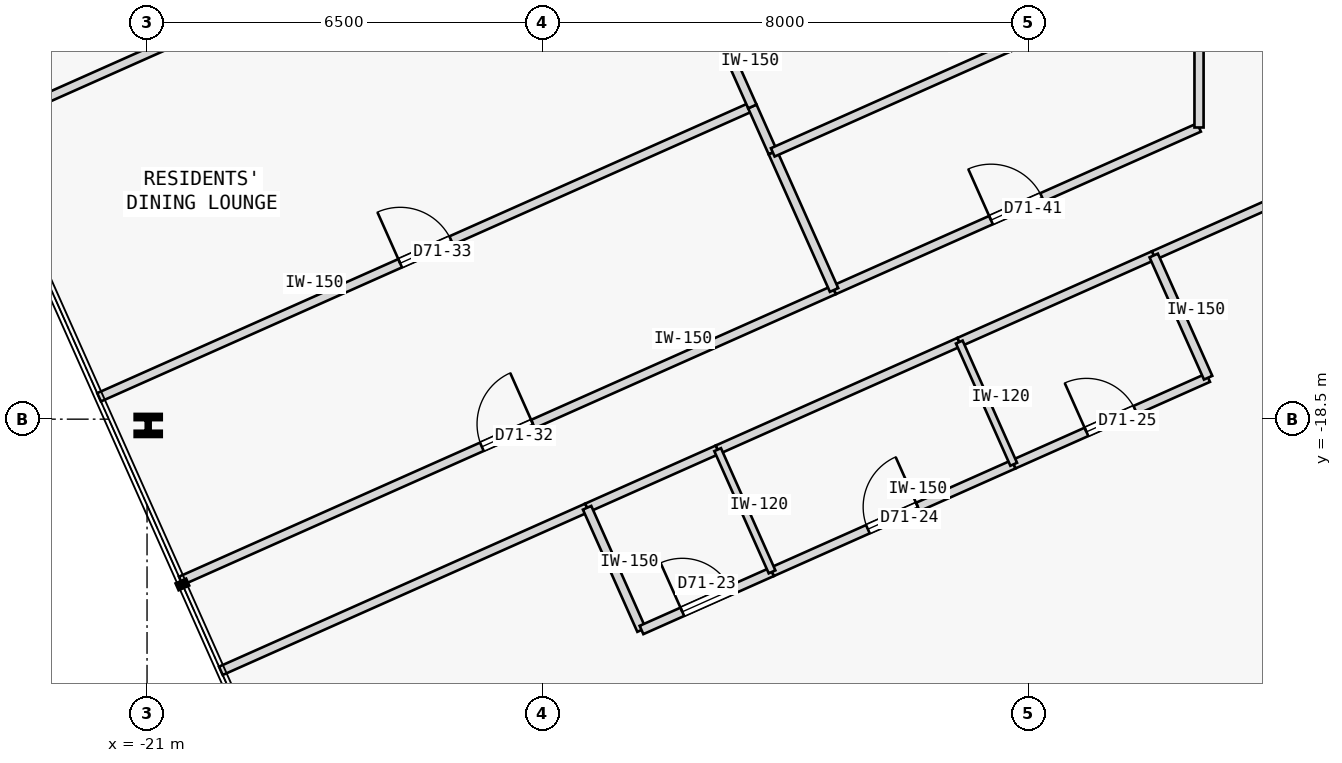
"""IFC4 building model, lengths in metres.
Left out: names, types, materials, properties, quantities, classifications, styles, units other than length and angle.
Written with IfcOpenShell. Run it as: python <this file> out.ifc"""

import sys

from ifc_helpers import new_model, si_unit, direction, frame, frame_2d, origin, origin_2d, place, context, subcontext, project, spatial, rectangle, i_section, extrude, element, fill, save


model = new_model("IFC4")
c1 = context("Model", 3, precision=1e-05, world=origin(), true_north=direction((0.0, 1.0)))
c2 = subcontext(c1, "Body", "Model", "MODEL_VIEW")
j1 = project(units=[si_unit("LENGTHUNIT", "METRE"), si_unit("PLANEANGLEUNIT", "RADIAN")], contexts=[c1])
p1 = place(None, origin())
s1 = spatial("IfcSite", under=j1, at=p1, CompositionType="ELEMENT")
p2 = place(p1, origin())
s2 = spatial("IfcBuilding", under=s1, at=p2, CompositionType="ELEMENT")
p3 = place(p2, frame((0.0, 0.0, 265.55)))
s3 = spatial("IfcBuildingStorey", under=s2, at=p3, CompositionType="ELEMENT", Elevation=265.55)
p4 = place(p3, frame((-20.981, -18.603, 0.0), z_axis=(0.0, 0.0, 1.0), x_axis=(1.0, 0.0, 0.0)))
e1 = element("IfcColumn", 1, at=p4, inside=s3, PredefinedType="COLUMN", context=c2, shape_type="SweptSolid", body=[
    extrude(i_section(OverallWidth=0.401, OverallDepth=0.335, WebThickness=0.036, FlangeThickness=0.058, FilletRadius=0.015, at=origin_2d()), origin(), (0.0, 0.0, 1.0), 3.35),
])
p5 = place(p3, frame((-19.786, -22.639, 0.0), z_axis=(0.0, 0.0, 1.0), x_axis=(0.913548717067, 0.406729322211, 0.0)))
e2 = element("IfcWall", 2, at=p5, inside=s3, PredefinedType="PARTITIONING", context=c2, shape_type="SweptSolid", body=[
    extrude(rectangle(XDim=6.593, YDim=0.15, at=frame_2d((3.297, 0.0))), origin(), (0.0, 0.0, 1.0), 3.125),
])
p6 = place(p3, frame((-4.445, -15.808, 0.0), z_axis=(0.0, 0.0, 1.0), x_axis=(0.913546853922, 0.406733506966, 0.0)))
e3 = element("IfcWall", 3, at=p6, inside=s3, PredefinedType="PARTITIONING", context=c2, shape_type="SweptSolid", body=[
    extrude(rectangle(XDim=12.751, YDim=0.15, at=frame_2d((6.375, 0.0))), origin(), (0.0, 0.0, 1.0), 3.125),
])
p7 = place(p6, frame((5.9, 0.0, 0.0)))
e4 = element("IfcOpeningElement", 4, at=p7, cuts=e3, PredefinedType="OPENING", context=c2, shape_type="SweptSolid", body=[
    extrude(rectangle(XDim=0.95, YDim=2.15, at=frame_2d((0.475, 1.075))), frame((0.0, 0.085, 0.0), z_axis=(0.0, -1.0, 0.0), x_axis=(1.0, 0.0, 0.0)), (0.0, 0.0, 1.0), 0.17),
])
p8 = place(p3, frame((-13.763, -19.957, 0.0), z_axis=(0.0, 0.0, 1.0), x_axis=(0.913541436194, 0.406745675276, 0.0)))
e5 = element("IfcWall", 5, at=p8, inside=s3, PredefinedType="PARTITIONING", context=c2, shape_type="SweptSolid", body=[
    extrude(rectangle(XDim=2.35, YDim=0.15, at=frame_2d((1.175, 0.0))), origin(), (0.0, 0.0, 1.0), 3.125),
])
p9 = place(p3, frame((-11.616, -19.001, 0.0), z_axis=(0.0, 0.0, 1.0), x_axis=(0.913545193015, 0.406737237438, 0.0)))
e6 = element("IfcWall", 6, at=p9, inside=s3, PredefinedType="PARTITIONING", context=c2, shape_type="SweptSolid", body=[
    extrude(rectangle(XDim=4.35, YDim=0.15, at=frame_2d((2.175, 0.0))), origin(), (0.0, 0.0, 1.0), 3.125),
])
p10 = place(p3, frame((-7.643, -17.232, 0.0), z_axis=(0.0, 0.0, 1.0), x_axis=(0.913549606868, 0.406727323635, 0.0)))
e7 = element("IfcWall", 7, at=p10, inside=s3, PredefinedType="PARTITIONING", context=c2, shape_type="SweptSolid", body=[
    extrude(rectangle(XDim=3.5, YDim=0.15, at=frame_2d((1.75, 0.0))), origin(), (0.0, 0.0, 1.0), 3.125),
])
p11 = place(p3, frame((-20.445, -21.159, 0.0), z_axis=(0.0, 0.0, 1.0), x_axis=(0.913547681516, 0.406731648137, 0.0)))
e8 = element("IfcWall", 8, at=p11, inside=s3, PredefinedType="PARTITIONING", context=c2, shape_type="SweptSolid", body=[
    extrude(rectangle(XDim=11.76, YDim=0.15, at=frame_2d((5.88, 0.0))), origin(), (0.0, 0.0, 1.0), 3.125),
])
p12 = place(p11, frame((5.42, 0.0, 0.0)))
e9 = element("IfcOpeningElement", 9, at=p12, cuts=e8, PredefinedType="OPENING", context=c2, shape_type="SweptSolid", body=[
    extrude(rectangle(XDim=0.92, YDim=2.15, at=frame_2d((0.46, 1.075))), frame((0.0, 0.085, 0.0), z_axis=(0.0, -1.0, 0.0), x_axis=(1.0, 0.0, 0.0)), (0.0, 0.0, 1.0), 0.17),
])
p13 = place(p3, frame((-9.702, -16.375, 0.0), z_axis=(0.0, 0.0, 1.0), x_axis=(0.913552389019, 0.406721074594, 0.0)))
e10 = element("IfcWall", 10, at=p13, inside=s3, PredefinedType="PARTITIONING", context=c2, shape_type="SweptSolid", body=[
    extrude(rectangle(XDim=6.57, YDim=0.15, at=frame_2d((3.285, 0.0))), origin(), (0.0, 0.0, 1.0), 3.125),
])
p14 = place(p13, frame((2.825, 0.0, 0.0)))
e11 = element("IfcOpeningElement", 11, at=p14, cuts=e10, PredefinedType="OPENING", context=c2, shape_type="SweptSolid", body=[
    extrude(rectangle(XDim=0.92, YDim=2.15, at=frame_2d((0.46, 1.075))), frame((0.0, 0.085, 0.0), z_axis=(0.0, -1.0, 0.0), x_axis=(1.0, 0.0, 0.0)), (0.0, 0.0, 1.0), 0.17),
])
p15 = place(p3, frame((-3.7, -13.703, 0.0), z_axis=(0.0, 0.0, 1.0), x_axis=(9.0033312e-05, 0.999999995947, 0.0)))
e12 = element("IfcWall", 12, at=p15, inside=s3, PredefinedType="PARTITIONING", context=c2, shape_type="SweptSolid", body=[
    extrude(rectangle(XDim=2.712, YDim=0.15, at=frame_2d((1.356, 0.0))), origin(), (0.0, 0.0, 1.0), 3.125),
])
p16 = place(p3, frame((-12.868, -21.967, 0.0), z_axis=(0.0, 0.0, 1.0), x_axis=(-0.406725294076, 0.913550510459, 0.0)))
e13 = element("IfcWall", 13, at=p16, inside=s3, PredefinedType="PARTITIONING", context=c2, shape_type="SweptSolid", body=[
    extrude(rectangle(XDim=2.2, YDim=0.15, at=frame_2d((1.1, 0.0))), origin(), (0.0, 0.0, 1.0), 3.125),
])
p17 = place(p3, frame((-12.868, -21.967, 0.0), z_axis=(0.0, 0.0, 1.0), x_axis=(0.913541436194, 0.406745675276, 0.0)))
e14 = element("IfcWall", 14, at=p17, inside=s3, PredefinedType="PARTITIONING", context=c2, shape_type="SweptSolid", body=[
    extrude(rectangle(XDim=2.35, YDim=0.15, at=frame_2d((1.175, 0.0))), origin(), (0.0, 0.0, 1.0), 3.125),
])
p18 = place(p17, frame((0.735, 0.0, 0.0)))
e15 = element("IfcOpeningElement", 15, at=p18, cuts=e14, PredefinedType="OPENING", context=c2, shape_type="SweptSolid", body=[
    extrude(rectangle(XDim=0.88, YDim=2.15, at=frame_2d((0.44, 1.075))), frame((0.0, 0.085, 0.0), z_axis=(0.0, -1.0, 0.0), x_axis=(1.0, 0.0, 0.0)), (0.0, 0.0, 1.0), 0.17),
])
p19 = place(p3, frame((-10.722, -21.011, 0.0), z_axis=(0.0, 0.0, 1.0), x_axis=(0.913545193015, 0.406737237438, 0.0)))
e16 = element("IfcWall", 16, at=p19, inside=s3, PredefinedType="PARTITIONING", context=c2, shape_type="SweptSolid", body=[
    extrude(rectangle(XDim=4.35, YDim=0.15, at=frame_2d((2.175, 0.0))), origin(), (0.0, 0.0, 1.0), 3.125),
])
p20 = place(p19, frame((1.725, 0.0, 0.0)))
e17 = element("IfcOpeningElement", 17, at=p20, cuts=e16, PredefinedType="OPENING", context=c2, shape_type="SweptSolid", body=[
    extrude(rectangle(XDim=0.9, YDim=2.15, at=frame_2d((0.45, 1.075))), frame((0.0, 0.085, 0.0), z_axis=(0.0, -1.0, 0.0), x_axis=(1.0, 0.0, 0.0)), (0.0, 0.0, 1.0), 0.17),
])
p21 = place(p3, frame((-6.748, -19.242, 0.0), z_axis=(0.0, 0.0, 1.0), x_axis=(0.913549606868, 0.406727323635, 0.0)))
e18 = element("IfcWall", 18, at=p21, inside=s3, PredefinedType="PARTITIONING", context=c2, shape_type="SweptSolid", body=[
    extrude(rectangle(XDim=3.5, YDim=0.15, at=frame_2d((1.75, 0.0))), origin(), (0.0, 0.0, 1.0), 3.125),
])
p22 = place(p21, frame((1.31, 0.0, 0.0)))
e19 = element("IfcOpeningElement", 19, at=p22, cuts=e18, PredefinedType="OPENING", context=c2, shape_type="SweptSolid", body=[
    extrude(rectangle(XDim=0.88, YDim=2.15, at=frame_2d((0.44, 1.075))), frame((0.0, 0.085, 0.0), z_axis=(0.0, -1.0, 0.0), x_axis=(1.0, 0.0, 0.0)), (0.0, 0.0, 1.0), 0.17),
])
p23 = place(p3, frame((-3.55, -17.818, 0.0), z_axis=(0.0, 0.0, 1.0), x_axis=(-0.406725294076, 0.913550510459, 0.0)))
e20 = element("IfcWall", 20, at=p23, inside=s3, PredefinedType="PARTITIONING", context=c2, shape_type="SweptSolid", body=[
    extrude(rectangle(XDim=2.2, YDim=0.15, at=frame_2d((1.1, 0.0))), origin(), (0.0, 0.0, 1.0), 3.125),
])
for number, where, z_axis, x_axis in (
    (21, (-10.722, -21.011, 0.0), (0.0, 0.0, 1.0), (-0.407, 0.914, 0.0)),
    (22, (-6.748, -19.242, 0.0), (0.0, 0.0, 1.0), (-0.407, 0.914, 0.0)),
):
    element("IfcWall", number, at=place(p3, frame(where, z_axis=z_axis, x_axis=x_axis)), inside=s3, PredefinedType="PARTITIONING", context=c2, shape_type="SweptSolid", body=[
        extrude(rectangle(XDim=2.2, YDim=0.12, at=frame_2d((1.1, 0.0))), origin(), (0.0, 0.0, 1.0), 3.125),
    ])
p24 = place(p3, frame((-21.789, -18.14, 0.0), z_axis=(0.0, 0.0, 1.0), x_axis=(0.913544247064, 0.406739362069, 0.0)))
e23 = element("IfcWall", 23, at=p24, inside=s3, PredefinedType="PARTITIONING", context=c2, shape_type="SweptSolid", body=[
    extrude(rectangle(XDim=11.76, YDim=0.15, at=frame_2d((5.88, 0.0))), origin(), (0.0, 0.0, 1.0), 3.125),
])
p25 = place(p24, frame((5.42, 0.0, 0.0)))
e24 = element("IfcOpeningElement", 24, at=p25, cuts=e23, PredefinedType="OPENING", context=c2, shape_type="SweptSolid", body=[
    extrude(rectangle(XDim=0.92, YDim=2.15, at=frame_2d((0.46, 1.075))), frame((0.0, 0.085, 0.0), z_axis=(0.0, -1.0, 0.0), x_axis=(1.0, 0.0, 0.0)), (0.0, 0.0, 1.0), 0.17),
])
p26 = place(p3, frame((-9.702, -16.375, 0.0), z_axis=(0.0, 0.0, 1.0), x_axis=(-0.406787689018, 0.913522728816, 0.0)))
e25 = element("IfcWall", 25, at=p26, inside=s3, PredefinedType="PARTITIONING", context=c2, shape_type="SweptSolid", body=[
    extrude(rectangle(XDim=2.477, YDim=0.15, at=frame_2d((1.238, 0.0))), origin(), (0.0, 0.0, 1.0), 3.125),
])
p27 = place(p3, frame((-10.709, -14.113, 0.0), z_axis=(0.0, 0.0, 1.0), x_axis=(-0.406740884734, 0.913543569123, 0.0)))
e26 = element("IfcWall", 26, at=p27, inside=s3, PredefinedType="PARTITIONING", context=c2, shape_type="SweptSolid", body=[
    extrude(rectangle(XDim=0.827, YDim=0.15, at=frame_2d((0.414, 0.0))), origin(), (0.0, 0.0, 1.0), 3.125),
])
p28 = place(p3, frame((-23.76, -13.713, 0.0), z_axis=(0.0, 0.0, 1.0), x_axis=(0.913544247064, 0.406739362069, 0.0)))
e27 = element("IfcWall", 27, at=p28, inside=s3, PredefinedType="PARTITIONING", context=c2, shape_type="SweptSolid", body=[
    extrude(rectangle(XDim=11.76, YDim=0.15, at=frame_2d((5.88, 0.0))), origin(), (0.0, 0.0, 1.0), 3.125),
])
p29 = place(p28, frame((5.42, 0.0, 0.0)))
e28 = element("IfcOpeningElement", 28, at=p29, cuts=e27, PredefinedType="OPENING", context=c2, shape_type="SweptSolid", body=[
    extrude(rectangle(XDim=0.92, YDim=2.15, at=frame_2d((0.46, 1.075))), frame((0.0, 0.085, 0.0), z_axis=(0.0, -1.0, 0.0), x_axis=(1.0, 0.0, 0.0)), (0.0, 0.0, 1.0), 0.17),
])
p30 = place(p3, frame((-11.046, -13.357, 0.0), z_axis=(0.0, 0.0, 1.0), x_axis=(-0.406707553978, 0.913558408388, 0.0)))
e29 = element("IfcWall", 29, at=p30, inside=s3, PredefinedType="PARTITIONING", context=c2, shape_type="SweptSolid", body=[
    extrude(rectangle(XDim=3.184, YDim=0.15, at=frame_2d((1.592, 0.0))), origin(), (0.0, 0.0, 1.0), 3.125),
])
p31 = place(p3, frame((-10.709, -14.113, 0.0), z_axis=(0.0, 0.0, 1.0), x_axis=(0.91353843513, 0.40675241553, 0.0)))
e30 = element("IfcWall", 30, at=p31, inside=s3, PredefinedType="PARTITIONING", context=c2, shape_type="SweptSolid", body=[
    extrude(rectangle(XDim=7.673, YDim=0.15, at=frame_2d((3.836, 0.0))), origin(), (0.0, 0.0, 1.0), 3.125),
])
p32 = place(p18, origin())
e31 = element("IfcDoor", 31, at=p32, inside=s3, OperationType="SINGLE_SWING_LEFT", PredefinedType="DOOR", context=c2, shape_type="SweptSolid", body=[
    extrude(rectangle(XDim=0.88, YDim=2.15, at=frame_2d((0.44, 1.075))), frame((0.0, 0.025, 0.0), z_axis=(0.0, -1.0, 0.0), x_axis=(1.0, 0.0, 0.0)), (0.0, 0.0, 1.0), 0.05),
])
fill(e15, e31)
p33 = place(p20, origin())
e32 = element("IfcDoor", 32, at=p33, inside=s3, OperationType="SINGLE_SWING_RIGHT", PredefinedType="DOOR", context=c2, shape_type="SweptSolid", body=[
    extrude(rectangle(XDim=0.9, YDim=2.15, at=frame_2d((0.45, 1.075))), frame((0.0, 0.025, 0.0), z_axis=(0.0, -1.0, 0.0), x_axis=(1.0, 0.0, 0.0)), (0.0, 0.0, 1.0), 0.05),
])
fill(e17, e32)
p34 = place(p22, origin())
e33 = element("IfcDoor", 33, at=p34, inside=s3, OperationType="SINGLE_SWING_LEFT", PredefinedType="DOOR", context=c2, shape_type="SweptSolid", body=[
    extrude(rectangle(XDim=0.88, YDim=2.15, at=frame_2d((0.44, 1.075))), frame((0.0, 0.025, 0.0), z_axis=(0.0, -1.0, 0.0), x_axis=(1.0, 0.0, 0.0)), (0.0, 0.0, 1.0), 0.05),
])
fill(e19, e33)
p35 = place(p12, origin())
e34 = element("IfcDoor", 34, at=p35, inside=s3, OperationType="SINGLE_SWING_RIGHT", PredefinedType="DOOR", context=c2, shape_type="SweptSolid", body=[
    extrude(rectangle(XDim=0.92, YDim=2.15, at=frame_2d((0.46, 1.075))), frame((0.0, 0.025, 0.0), z_axis=(0.0, -1.0, 0.0), x_axis=(1.0, 0.0, 0.0)), (0.0, 0.0, 1.0), 0.05),
])
fill(e9, e34)
p36 = place(p25, origin())
e35 = element("IfcDoor", 35, at=p36, inside=s3, OperationType="SINGLE_SWING_LEFT", PredefinedType="DOOR", context=c2, shape_type="SweptSolid", body=[
    extrude(rectangle(XDim=0.92, YDim=2.15, at=frame_2d((0.46, 1.075))), frame((0.0, 0.025, 0.0), z_axis=(0.0, -1.0, 0.0), x_axis=(1.0, 0.0, 0.0)), (0.0, 0.0, 1.0), 0.05),
])
fill(e24, e35)
p37 = place(p14, origin())
e36 = element("IfcDoor", 36, at=p37, inside=s3, OperationType="SINGLE_SWING_LEFT", PredefinedType="DOOR", context=c2, shape_type="SweptSolid", body=[
    extrude(rectangle(XDim=0.92, YDim=2.15, at=frame_2d((0.46, 1.075))), frame((0.0, 0.025, 0.0), z_axis=(0.0, -1.0, 0.0), x_axis=(1.0, 0.0, 0.0)), (0.0, 0.0, 1.0), 0.05),
])
fill(e11, e36)
save(model, sys.argv[1])
